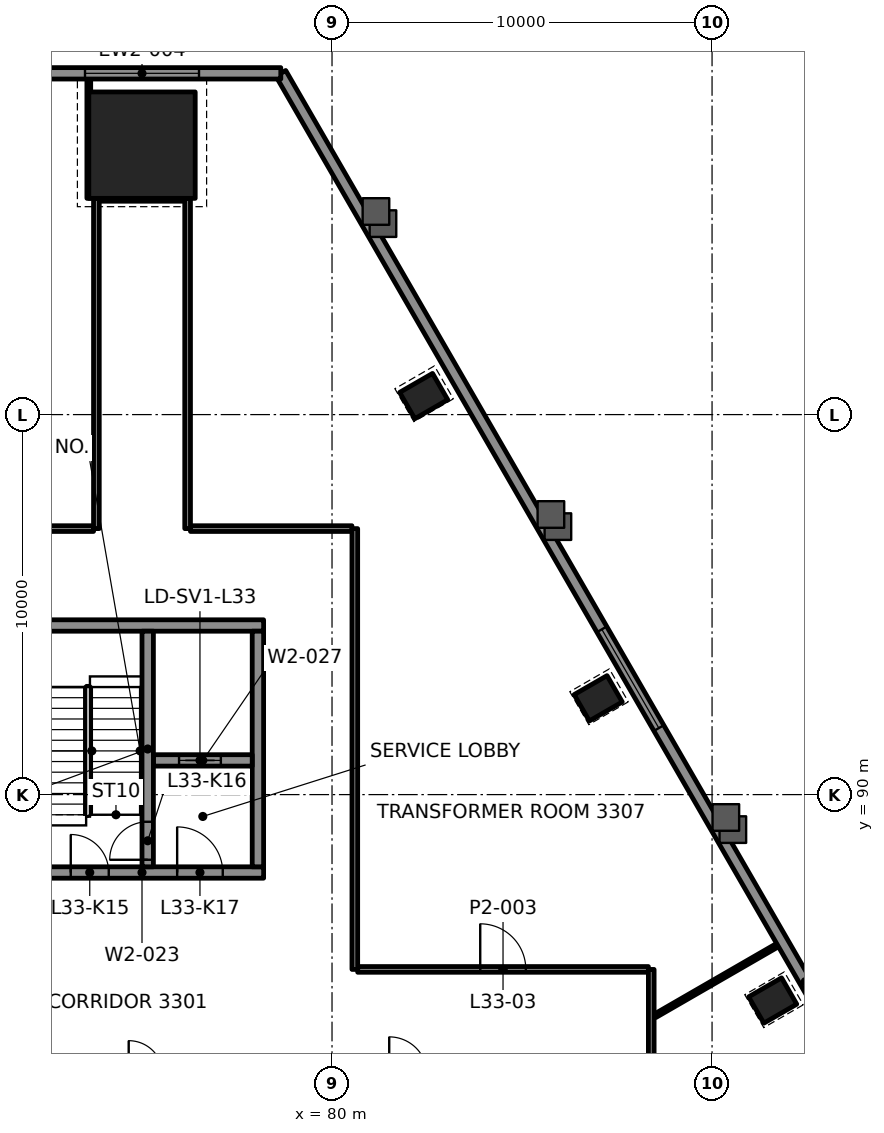
"""IFC4 building model, lengths in metres.
Left out: names, types, materials, properties, quantities, classifications, styles, units other than length and angle.
Written with IfcOpenShell. Run it as: python <this file> out.ifc"""

import sys

from ifc_helpers import new_model, si_unit, direction, frame, frame_2d, origin, origin_2d, place, context, subcontext, project, spatial, rectangle, hollow_rectangle, extrude, element, fill, save


model = new_model("IFC4")
c1 = context("Model", 3, precision=1e-05, world=origin(), true_north=direction((0.0, 1.0)))
c2 = subcontext(c1, "Body", "Model", "MODEL_VIEW")
j1 = project(units=[si_unit("LENGTHUNIT", "METRE"), si_unit("PLANEANGLEUNIT", "RADIAN")], contexts=[c1])
p1 = place(None, origin())
s1 = spatial("IfcSite", under=j1, at=p1, CompositionType="ELEMENT")
p2 = place(p1, origin())
s2 = spatial("IfcBuilding", under=s1, at=p2, CompositionType="ELEMENT")
p3 = place(p2, frame((0.0, 0.0, 146.8)))
s3 = spatial("IfcBuildingStorey", under=s2, at=p3, CompositionType="ELEMENT", Elevation=146.8)
p4 = place(p3, frame((75.0, 107.091, 0.0), z_axis=(0.0, 0.0, 1.0), x_axis=(-1.0, 0.0, 0.0)))
e1 = element("IfcColumn", 1, at=p4, inside=s3, PredefinedType="COLUMN", context=c2, shape_type="SweptSolid", body=[
    extrude(rectangle(XDim=2.8, YDim=2.8, at=origin_2d()), origin(), (0.0, 0.0, 1.0), 4.5),
])
for number, where, z_axis, x_axis in (
    (2, (91.595, 84.582, -0.0), (0.0, 0.0, 1.0), (-0.5, 0.866, 0.0)),
    (3, (87.004, 92.534, -0.0), (0.0, 0.0, 1.0), (-0.5, 0.866, 0.0)),
    (4, (82.412, 100.488, -0.0), (0.0, 0.0, 1.0), (-0.5, 0.866, 0.0)),
):
    element("IfcColumn", number, at=place(p3, frame(where, z_axis=z_axis, x_axis=x_axis)), inside=s3, PredefinedType="COLUMN", context=c2, shape_type="SweptSolid", body=[
        extrude(hollow_rectangle(XDim=0.8, YDim=1.0, WallThickness=0.05, at=origin_2d()), origin(), (0.0, 0.0, 1.0), 4.5),
    ])
p5 = place(p3, frame((71.8, 87.95, 0.0), z_axis=(0.0, 0.0, 1.0), x_axis=(1.0, 0.0, 0.0)))
e5 = element("IfcWall", 5, at=p5, inside=s3, PredefinedType="SHEAR", context=c2, shape_type="SweptSolid", body=[
    extrude(rectangle(XDim=6.4, YDim=0.3, at=frame_2d((3.2, 0.0))), origin(), (0.0, 0.0, 1.0), 4.05),
])
p6 = place(p5, frame((1.325, 0.0, 0.0)))
e6 = element("IfcOpeningElement", 6, at=p6, cuts=e5, PredefinedType="OPENING", context=c2, shape_type="SweptSolid", body=[
    extrude(rectangle(XDim=1.0, YDim=2.1, at=frame_2d((0.5, 1.05))), frame((0.0, 0.16, 0.0), z_axis=(0.0, -1.0, 0.0), x_axis=(1.0, 0.0, 0.0)), (0.0, 0.0, 1.0), 0.32),
])
p7 = place(p5, frame((4.125, 0.0, 0.0)))
e7 = element("IfcOpeningElement", 7, at=p7, cuts=e5, PredefinedType="OPENING", context=c2, shape_type="SweptSolid", body=[
    extrude(rectangle(XDim=1.2, YDim=2.1, at=frame_2d((0.6, 1.05))), frame((0.0, 0.16, 0.0), z_axis=(0.0, -1.0, 0.0), x_axis=(1.0, 0.0, 0.0)), (0.0, 0.0, 1.0), 0.32),
])
p8 = place(p3, frame((71.8, 94.45, 0.0), z_axis=(0.0, 0.0, 1.0), x_axis=(1.0, 0.0, 0.0)))
e8 = element("IfcWall", 8, at=p8, inside=s3, PredefinedType="SHEAR", context=c2, shape_type="SweptSolid", body=[
    extrude(rectangle(XDim=6.4, YDim=0.3, at=frame_2d((3.2, 0.0))), origin(), (0.0, 0.0, 1.0), 4.05),
])
p9 = place(p3, frame((78.05, 88.1, 0.0), z_axis=(0.0, 0.0, 1.0), x_axis=(0.0, 1.0, 0.0)))
e9 = element("IfcWall", 9, at=p9, inside=s3, PredefinedType="SHEAR", context=c2, shape_type="SweptSolid", body=[
    extrude(rectangle(XDim=6.2, YDim=0.3, at=frame_2d((3.1, 0.0))), origin(), (0.0, 0.0, 1.0), 4.05),
])
p10 = place(p3, frame((75.3, 90.9, 0.0), z_axis=(0.0, 0.0, 1.0), x_axis=(1.0, 0.0, 0.0)))
e10 = element("IfcWall", 10, at=p10, inside=s3, PredefinedType="SHEAR", context=c2, shape_type="SweptSolid", body=[
    extrude(rectangle(XDim=2.6, YDim=0.3, at=frame_2d((1.3, 0.0))), origin(), (0.0, 0.0, 1.0), 4.05),
])
p11 = place(p10, frame((0.675, 0.0, 0.0)))
e11 = element("IfcOpeningElement", 11, at=p11, cuts=e10, PredefinedType="OPENING", context=c2, shape_type="SweptSolid", body=[
    extrude(rectangle(XDim=1.1, YDim=2.1, at=frame_2d((0.55, 1.05))), frame((0.0, 0.16, 0.0), z_axis=(0.0, -1.0, 0.0), x_axis=(1.0, 0.0, 0.0)), (0.0, 0.0, 1.0), 0.32),
])
p12 = place(p3, frame((75.15, 88.1, 0.0), z_axis=(0.0, 0.0, 1.0), x_axis=(0.0, 1.0, 0.0)))
e12 = element("IfcWall", 12, at=p12, inside=s3, PredefinedType="SHEAR", context=c2, shape_type="SweptSolid", body=[
    extrude(rectangle(XDim=6.2, YDim=0.3, at=frame_2d((3.1, 0.0))), origin(), (0.0, 0.0, 1.0), 4.05),
])
p13 = place(p12, frame((0.185, 0.0, 0.0)))
e13 = element("IfcOpeningElement", 13, at=p13, cuts=e12, PredefinedType="OPENING", context=c2, shape_type="SweptSolid", body=[
    extrude(rectangle(XDim=1.0, YDim=2.1, at=frame_2d((0.5, 1.05))), frame((0.0, 0.16, 0.0), z_axis=(0.0, -1.0, 0.0), x_axis=(1.0, 0.0, 0.0)), (0.0, 0.0, 1.0), 0.32),
])
p14 = place(p3, frame((80.675, 85.4, 0.0), z_axis=(0.0, 0.0, 1.0), x_axis=(1.0, 0.0, 0.0)))
e14 = element("IfcWall", 14, at=p14, inside=s3, PredefinedType="PARTITIONING", context=c2, shape_type="SweptSolid", body=[
    extrude(rectangle(XDim=7.649, YDim=0.15, at=frame_2d((3.825, 0.0))), origin(), (0.0, 0.0, 1.0), 3.45),
])
p15 = place(p14, frame((3.225, 0.0, 0.0)))
e15 = element("IfcOpeningElement", 15, at=p15, cuts=e14, PredefinedType="OPENING", context=c2, shape_type="SweptSolid", body=[
    extrude(rectangle(XDim=1.2, YDim=2.1, at=frame_2d((0.6, 1.05))), frame((0.0, 0.085, 0.0), z_axis=(0.0, -1.0, 0.0), x_axis=(1.0, 0.0, 0.0)), (0.0, 0.0, 1.0), 0.17),
])
p16 = place(p3, frame((69.476, 97.0, 0.0), z_axis=(0.0, 0.0, 1.0), x_axis=(1.0, 0.0, 0.0)))
e16 = element("IfcWall", 16, at=p16, inside=s3, PredefinedType="PARTITIONING", context=c2, shape_type="SweptSolid", body=[
    extrude(rectangle(XDim=4.25, YDim=0.15, at=frame_2d((2.125, 0.0))), origin(), (0.0, 0.0, 1.0), 3.45),
])
p17 = place(p16, frame((1.675, 0.0, 0.0)))
e17 = element("IfcOpeningElement", 17, at=p17, cuts=e16, PredefinedType="OPENING", context=c2, shape_type="SweptSolid", body=[
    extrude(rectangle(XDim=0.9, YDim=2.1, at=frame_2d((0.45, 1.05))), frame((0.0, 0.085, 0.0), z_axis=(0.0, -1.0, 0.0), x_axis=(1.0, 0.0, 0.0)), (0.0, 0.0, 1.0), 0.17),
])
p18 = place(p3, frame((76.275, 97.0, 0.0), z_axis=(0.0, 0.0, 1.0), x_axis=(1.0, 0.0, 0.0)))
e18 = element("IfcWall", 18, at=p18, inside=s3, PredefinedType="PARTITIONING", context=c2, shape_type="SweptSolid", body=[
    extrude(rectangle(XDim=4.249, YDim=0.15, at=frame_2d((2.125, 0.0))), origin(), (0.0, 0.0, 1.0), 3.45),
])
p19 = place(p3, frame((73.881, 105.69, 0.0), z_axis=(0.0, 0.0, 1.0), x_axis=(1.0, 0.0, 0.0)))
e19 = element("IfcWall", 19, at=p19, inside=s3, PredefinedType="PARTITIONING", context=c2, shape_type="SweptSolid", body=[
    extrude(rectangle(XDim=2.244, YDim=0.15, at=frame_2d((1.122, 0.0))), origin(), (0.0, 0.0, 1.0), 3.447),
])
p20 = place(p3, frame((88.5, 84.179, 0.0), z_axis=(0.0, 0.0, 1.0), x_axis=(0.866013078485, 0.500021347437, 0.0)))
e20 = element("IfcWall", 20, at=p20, inside=s3, PredefinedType="PARTITIONING", context=c2, shape_type="SweptSolid", body=[
    extrude(rectangle(XDim=3.842, YDim=0.1, at=frame_2d((1.921, 0.0))), origin(), (0.0, 0.0, 1.0), 3.215),
])
p21 = place(p3, frame((88.4, 85.399, 0.0), z_axis=(0.0, 0.0, 1.0), x_axis=(0.0, -1.0, 0.0)))
e21 = element("IfcWall", 21, at=p21, inside=s3, PredefinedType="PARTITIONING", context=c2, shape_type="SweptSolid", body=[
    extrude(rectangle(XDim=16.75, YDim=0.15, at=frame_2d((8.375, 0.0))), origin(), (0.0, 0.0, 1.0), 3.45),
])
p22 = place(p21, frame((8.463, 0.0, 0.0)))
e22 = element("IfcOpeningElement", 22, at=p22, cuts=e21, PredefinedType="OPENING", context=c2, shape_type="SweptSolid", body=[
    extrude(rectangle(XDim=0.9, YDim=2.1, at=frame_2d((0.45, 1.05))), frame((0.0, 0.085, 0.0), z_axis=(0.0, -1.0, 0.0), x_axis=(1.0, 0.0, 0.0)), (0.0, 0.0, 1.0), 0.17),
])
p23 = place(p3, frame((80.6, 85.4, 0.0), z_axis=(0.0, 0.0, 1.0), x_axis=(0.0, 1.0, 0.0)))
e23 = element("IfcWall", 23, at=p23, inside=s3, PredefinedType="PARTITIONING", context=c2, shape_type="SweptSolid", body=[
    extrude(rectangle(XDim=11.6, YDim=0.15, at=frame_2d((5.8, 0.0))), origin(), (0.0, 0.0, 1.0), 3.372),
])
p24 = place(p3, frame((76.2, 97.0, 0.0), z_axis=(0.0, 0.0, 1.0), x_axis=(0.0, 1.0, 0.0)))
e24 = element("IfcWall", 24, at=p24, inside=s3, PredefinedType="PARTITIONING", context=c2, shape_type="SweptSolid", body=[
    extrude(rectangle(XDim=8.69, YDim=0.15, at=frame_2d((4.345, 0.0))), origin(), (0.0, 0.0, 1.0), 3.45),
])
p25 = place(p3, frame((73.8, 97.0, 0.0), z_axis=(0.0, 0.0, 1.0), x_axis=(0.0, 1.0, 0.0)))
e25 = element("IfcWall", 25, at=p25, inside=s3, PredefinedType="PARTITIONING", context=c2, shape_type="SweptSolid", body=[
    extrude(rectangle(XDim=8.69, YDim=0.15, at=frame_2d((4.345, 0.0))), origin(), (0.0, 0.0, 1.0), 3.45),
])
p26 = place(p3, frame((73.6, 105.691, 0.0), z_axis=(0.0, 0.0, 1.0), x_axis=(0.0, 1.0, 0.0)))
e26 = element("IfcWall", 26, at=p26, inside=s3, PredefinedType="PARTITIONING", context=c2, shape_type="SweptSolid", body=[
    extrude(rectangle(XDim=3.258, YDim=0.1, at=frame_2d((1.629, 0.0))), origin(), (0.0, 0.0, 1.0), 3.45),
])
p27 = place(p3, frame((106.254, 61.172, 0.0), z_axis=(0.0, 0.0, 1.0), x_axis=(-0.500000383388, 0.866025182435, 0.0)))
e27 = element("IfcWall", 27, at=p27, inside=s3, PredefinedType="SOLIDWALL", context=c2, shape_type="SweptSolid", body=[
    extrude(rectangle(XDim=55.204, YDim=0.3, at=frame_2d((27.602, 0.0))), origin(), (0.0, 0.0, 1.0), 4.05),
])
p28 = place(p27, frame((16.895, 0.0, 0.8)))
e28 = element("IfcOpeningElement", 28, at=p28, cuts=e27, PredefinedType="OPENING", context=c2, shape_type="SweptSolid", body=[
    extrude(rectangle(XDim=3.0, YDim=2.4, at=frame_2d((1.5, 1.2))), frame((0.0, 0.16, 0.0), z_axis=(0.0, -1.0, 0.0), x_axis=(1.0, 0.0, 0.0)), (0.0, 0.0, 1.0), 0.32),
])
p29 = place(p27, frame((35.309, 0.0, 0.8)))
e29 = element("IfcOpeningElement", 29, at=p29, cuts=e27, PredefinedType="OPENING", context=c2, shape_type="SweptSolid", body=[
    extrude(rectangle(XDim=3.0, YDim=2.4, at=frame_2d((1.5, 1.2))), frame((0.0, 0.16, 0.0), z_axis=(0.0, -1.0, 0.0), x_axis=(1.0, 0.0, 0.0)), (0.0, 0.0, 1.0), 0.32),
])
p30 = place(p3, frame((78.652, 108.98, 0.0), z_axis=(0.0, 0.0, 1.0), x_axis=(-1.0, 0.0, 0.0)))
e30 = element("IfcWall", 30, at=p30, inside=s3, PredefinedType="SOLIDWALL", context=c2, shape_type="SweptSolid", body=[
    extrude(rectangle(XDim=7.304, YDim=0.3, at=frame_2d((3.652, 0.0))), origin(), (0.0, 0.0, 1.0), 4.05),
])
p31 = place(p30, frame((2.152, 0.0, 0.8)))
e31 = element("IfcOpeningElement", 31, at=p31, cuts=e30, PredefinedType="OPENING", context=c2, shape_type="SweptSolid", body=[
    extrude(rectangle(XDim=3.0, YDim=2.4, at=frame_2d((1.5, 1.2))), frame((0.0, 0.16, 0.0), z_axis=(0.0, -1.0, 0.0), x_axis=(1.0, 0.0, 0.0)), (0.0, 0.0, 1.0), 0.32),
])
p32 = place(p15, origin())
e32 = element("IfcDoor", 32, at=p32, inside=s3, OperationType="DOUBLE_DOOR_SINGLE_SWING", PredefinedType="DOOR", context=c2, shape_type="SweptSolid", body=[
    extrude(rectangle(XDim=1.2, YDim=2.1, at=frame_2d((0.6, 1.05))), frame((0.0, 0.025, 0.0), z_axis=(0.0, -1.0, 0.0), x_axis=(1.0, 0.0, 0.0)), (0.0, 0.0, 1.0), 0.05),
])
fill(e15, e32)
p33 = place(p29, origin())
e33 = element("IfcWindow", 33, at=p33, inside=s3, PartitioningType="SINGLE_PANEL", PredefinedType="WINDOW", context=c2, shape_type="SweptSolid", body=[
    extrude(rectangle(XDim=3.0, YDim=2.4, at=frame_2d((1.5, 1.2))), frame((0.0, 0.03, 0.0), z_axis=(0.0, -1.0, 0.0), x_axis=(1.0, 0.0, 0.0)), (0.0, 0.0, 1.0), 0.06),
])
fill(e29, e33)
p34 = place(p31, origin())
e34 = element("IfcWindow", 34, at=p34, inside=s3, PartitioningType="SINGLE_PANEL", PredefinedType="WINDOW", context=c2, shape_type="SweptSolid", body=[
    extrude(rectangle(XDim=3.0, YDim=2.4, at=frame_2d((1.5, 1.2))), frame((0.0, 0.03, 0.0), z_axis=(0.0, -1.0, 0.0), x_axis=(1.0, 0.0, 0.0)), (0.0, 0.0, 1.0), 0.06),
])
fill(e31, e34)
p35 = place(p11, origin())
e35 = element("IfcDoor", 35, at=p35, inside=s3, OperationType="DOUBLE_DOOR_SLIDING", PredefinedType="DOOR", context=c2, shape_type="SweptSolid", body=[
    extrude(rectangle(XDim=1.1, YDim=2.1, at=frame_2d((0.55, 1.05))), frame((0.0, 0.025, 0.0), z_axis=(0.0, -1.0, 0.0), x_axis=(1.0, 0.0, 0.0)), (0.0, 0.0, 1.0), 0.05),
])
fill(e11, e35)
p36 = place(p6, origin())
e36 = element("IfcDoor", 36, at=p36, inside=s3, OperationType="SINGLE_SWING_RIGHT", PredefinedType="DOOR", context=c2, shape_type="SweptSolid", body=[
    extrude(rectangle(XDim=1.0, YDim=2.1, at=frame_2d((0.5, 1.05))), frame((0.0, 0.025, 0.0), z_axis=(0.0, -1.0, 0.0), x_axis=(1.0, 0.0, 0.0)), (0.0, 0.0, 1.0), 0.05),
])
fill(e6, e36)
p37 = place(p13, origin())
e37 = element("IfcDoor", 37, at=p37, inside=s3, OperationType="SINGLE_SWING_LEFT", PredefinedType="DOOR", context=c2, shape_type="SweptSolid", body=[
    extrude(rectangle(XDim=1.0, YDim=2.1, at=frame_2d((0.5, 1.05))), frame((0.0, 0.025, 0.0), z_axis=(0.0, -1.0, 0.0), x_axis=(1.0, 0.0, 0.0)), (0.0, 0.0, 1.0), 0.05),
])
fill(e13, e37)
p38 = place(p7, origin())
e38 = element("IfcDoor", 38, at=p38, inside=s3, OperationType="SINGLE_SWING_RIGHT", PredefinedType="DOOR", context=c2, shape_type="SweptSolid", body=[
    extrude(rectangle(XDim=1.2, YDim=2.1, at=frame_2d((0.6, 1.05))), frame((0.0, 0.025, 0.0), z_axis=(0.0, -1.0, 0.0), x_axis=(1.0, 0.0, 0.0)), (0.0, 0.0, 1.0), 0.05),
])
fill(e7, e38)
save(model, sys.argv[1])
